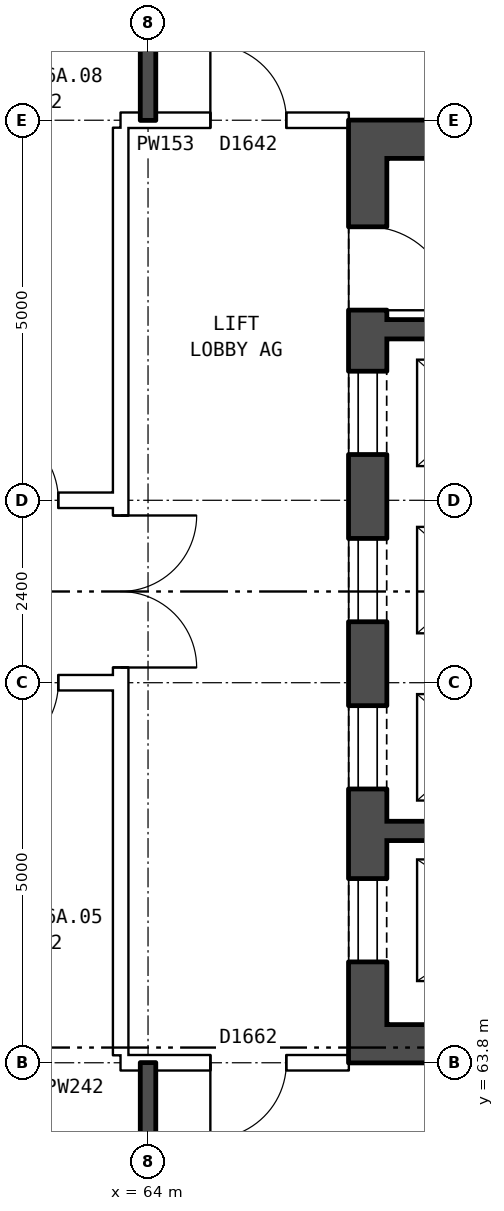
"""IFC4 building model, lengths in metres.
Left out: names, types, materials, properties, quantities, classifications, styles, units other than length and angle.
Written with IfcOpenShell. Run it as: python <this file> out.ifc"""

import sys

from ifc_helpers import new_model, si_unit, direction, frame, frame_2d, origin, place, context, subcontext, project, spatial, rectangle, extrude, element, fill, save


model = new_model("IFC4")
c1 = context("Model", 3, precision=1e-05, world=origin(), true_north=direction((0.0, 1.0)))
c2 = subcontext(c1, "Body", "Model", "MODEL_VIEW")
j1 = project(units=[si_unit("LENGTHUNIT", "METRE"), si_unit("PLANEANGLEUNIT", "RADIAN")], contexts=[c1])
p1 = place(None, origin())
s1 = spatial("IfcSite", under=j1, at=p1, CompositionType="ELEMENT")
p2 = place(p1, origin())
s2 = spatial("IfcBuilding", under=s1, at=p2, CompositionType="ELEMENT")
p3 = place(p2, frame((0.0, 0.0, 164.0)))
s3 = spatial("IfcBuildingStorey", under=s2, at=p3, CompositionType="ELEMENT", Elevation=164.0)
p4 = place(p3, frame((66.89, 63.8, 0.0), z_axis=(0.0, 0.0, 1.0), x_axis=(0.0, 1.0, 0.0)))
e1 = element("IfcWall", 1, at=p4, inside=s3, PredefinedType="SHEAR", context=c2, shape_type="SweptSolid", body=[
    extrude(rectangle(XDim=12.4, YDim=0.5, at=frame_2d((6.2, 0.0))), origin(), (0.0, 0.0, 1.0), 2.85),
])
p5 = place(p4, frame((1.325, 0.0, 0.0)))
e2 = element("IfcOpeningElement", 2, at=p5, cuts=e1, PredefinedType="OPENING", context=c2, shape_type="SweptSolid", body=[
    extrude(rectangle(XDim=1.1, YDim=2.1, at=frame_2d((0.55, 1.05))), frame((0.0, 0.26, 0.0), z_axis=(0.0, -1.0, 0.0), x_axis=(1.0, 0.0, 0.0)), (0.0, 0.0, 1.0), 0.52),
])
p6 = place(p4, frame((3.6, 0.0, 0.0)))
e3 = element("IfcOpeningElement", 3, at=p6, cuts=e1, PredefinedType="OPENING", context=c2, shape_type="SweptSolid", body=[
    extrude(rectangle(XDim=1.1, YDim=2.1, at=frame_2d((0.55, 1.05))), frame((0.0, 0.26, 0.0), z_axis=(0.0, -1.0, 0.0), x_axis=(1.0, 0.0, 0.0)), (0.0, 0.0, 1.0), 0.52),
])
p7 = place(p4, frame((5.8, 0.0, 0.0)))
e4 = element("IfcOpeningElement", 4, at=p7, cuts=e1, PredefinedType="OPENING", context=c2, shape_type="SweptSolid", body=[
    extrude(rectangle(XDim=1.1, YDim=2.1, at=frame_2d((0.55, 1.05))), frame((0.0, 0.26, 0.0), z_axis=(0.0, -1.0, 0.0), x_axis=(1.0, 0.0, 0.0)), (0.0, 0.0, 1.0), 0.52),
])
p8 = place(p4, frame((8.0, 0.0, 0.0)))
e5 = element("IfcOpeningElement", 5, at=p8, cuts=e1, PredefinedType="OPENING", context=c2, shape_type="SweptSolid", body=[
    extrude(rectangle(XDim=1.1, YDim=2.1, at=frame_2d((0.55, 1.05))), frame((0.0, 0.26, 0.0), z_axis=(0.0, -1.0, 0.0), x_axis=(1.0, 0.0, 0.0)), (0.0, 0.0, 1.0), 0.52),
])
p9 = place(p4, frame((9.9, 0.0, 0.0)))
e6 = element("IfcOpeningElement", 6, at=p9, cuts=e1, PredefinedType="OPENING", context=c2, shape_type="SweptSolid", body=[
    extrude(rectangle(XDim=1.1, YDim=2.1, at=frame_2d((0.55, 1.05))), frame((0.0, 0.26, 0.0), z_axis=(0.0, -1.0, 0.0), x_axis=(1.0, 0.0, 0.0)), (0.0, 0.0, 1.0), 0.52),
])
for number, where, z_axis, x_axis in (
    (7, (67.14, 64.05, 0.0), (0.0, 0.0, 1.0), (1.0, 0.0, 0.0)),
    (8, (67.14, 75.95, 0.0), (0.0, 0.0, 1.0), (1.0, 0.0, 0.0)),
):
    element("IfcWall", number, at=place(p3, frame(where, z_axis=z_axis, x_axis=x_axis)), inside=s3, PredefinedType="SHEAR", context=c2, shape_type="SweptSolid", body=[
        extrude(rectangle(XDim=8.0, YDim=0.5, at=frame_2d((4.0, 0.0))), origin(), (0.0, 0.0, 1.0), 2.85),
    ])
p10 = place(p3, frame((67.14, 66.85, 0.0), z_axis=(0.0, 0.0, 1.0), x_axis=(1.0, 0.0, 0.0)))
e9 = element("IfcWall", 9, at=p10, inside=s3, PredefinedType="SHEAR", context=c2, shape_type="SweptSolid", body=[
    extrude(rectangle(XDim=3.495, YDim=0.25, at=frame_2d((1.748, 0.0))), origin(), (0.0, 0.0, 1.0), 2.85),
])
p11 = place(p3, frame((67.14, 73.45, 0.0), z_axis=(0.0, 0.0, 1.0), x_axis=(1.0, 0.0, 0.0)))
e10 = element("IfcWall", 10, at=p11, inside=s3, PredefinedType="SHEAR", context=c2, shape_type="SweptSolid", body=[
    extrude(rectangle(XDim=2.425, YDim=0.25, at=frame_2d((1.212, 0.0))), origin(), (0.0, 0.0, 1.0), 2.85),
])
p12 = place(p3, frame((63.64, 63.9, 0.0), z_axis=(0.0, 0.0, 1.0), x_axis=(0.0, 1.0, 0.0)))
e11 = element("IfcWall", 11, at=p12, inside=s3, PredefinedType="PARTITIONING", context=c2, shape_type="SweptSolid", body=[
    extrude(rectangle(XDim=12.2, YDim=0.2, at=frame_2d((6.1, 0.0))), origin(), (0.0, 0.0, 1.0), 2.85),
])
p13 = place(p12, frame((5.1, 0.0, 0.0)))
e12 = element("IfcOpeningElement", 12, at=p13, cuts=e11, PredefinedType="OPENING", context=c2, shape_type="SweptSolid", body=[
    extrude(rectangle(XDim=2.0, YDim=2.1, at=frame_2d((1.0, 1.05))), frame((0.0, 0.11, 0.0), z_axis=(0.0, -1.0, 0.0), x_axis=(1.0, 0.0, 0.0)), (0.0, 0.0, 1.0), 0.22),
])
p14 = place(p3, frame((63.64, 63.8, 0.0), z_axis=(0.0, 0.0, 1.0), x_axis=(1.0, 0.0, 0.0)))
e13 = element("IfcWall", 13, at=p14, inside=s3, PredefinedType="PARTITIONING", context=c2, shape_type="SweptSolid", body=[
    extrude(rectangle(XDim=3.0, YDim=0.2, at=frame_2d((1.5, 0.0))), origin(), (0.0, 0.0, 1.0), 2.85),
])
p15 = place(p14, frame((1.18, 0.0, 0.0)))
e14 = element("IfcOpeningElement", 14, at=p15, cuts=e13, PredefinedType="OPENING", context=c2, shape_type="SweptSolid", body=[
    extrude(rectangle(XDim=1.0, YDim=2.1, at=frame_2d((0.5, 1.05))), frame((0.0, 0.11, 0.0), z_axis=(0.0, -1.0, 0.0), x_axis=(1.0, 0.0, 0.0)), (0.0, 0.0, 1.0), 0.22),
])
p16 = place(p3, frame((44.36, 68.8, 0.0), z_axis=(0.0, 0.0, 1.0), x_axis=(1.0, 0.0, 0.0)))
e15 = element("IfcWall", 15, at=p16, inside=s3, PredefinedType="PARTITIONING", context=c2, shape_type="SweptSolid", body=[
    extrude(rectangle(XDim=19.28, YDim=0.2, at=frame_2d((9.64, 0.0))), origin(), (0.0, 0.0, 1.0), 2.85),
])
p17 = place(p16, frame((17.46, 0.0, 0.0)))
e16 = element("IfcOpeningElement", 16, at=p17, cuts=e15, PredefinedType="OPENING", context=c2, shape_type="SweptSolid", body=[
    extrude(rectangle(XDim=1.0, YDim=2.1, at=frame_2d((0.5, 1.05))), frame((0.0, 0.11, 0.0), z_axis=(0.0, -1.0, 0.0), x_axis=(1.0, 0.0, 0.0)), (0.0, 0.0, 1.0), 0.22),
])
p18 = place(p16, frame((8.64, 0.0, 0.0)))
e17 = element("IfcOpeningElement", 17, at=p18, cuts=e15, PredefinedType="OPENING", context=c2, shape_type="SweptSolid", body=[
    extrude(rectangle(XDim=1.0, YDim=2.1, at=frame_2d((0.5, 1.05))), frame((0.0, 0.11, 0.0), z_axis=(0.0, -1.0, 0.0), x_axis=(1.0, 0.0, 0.0)), (0.0, 0.0, 1.0), 0.22),
])
p19 = place(p16, frame((2.64, 0.0, 0.0)))
e18 = element("IfcOpeningElement", 18, at=p19, cuts=e15, PredefinedType="OPENING", context=c2, shape_type="SweptSolid", body=[
    extrude(rectangle(XDim=1.0, YDim=2.1, at=frame_2d((0.5, 1.05))), frame((0.0, 0.11, 0.0), z_axis=(0.0, -1.0, 0.0), x_axis=(1.0, 0.0, 0.0)), (0.0, 0.0, 1.0), 0.22),
])
p20 = place(p3, frame((44.36, 71.2, 0.0), z_axis=(0.0, 0.0, 1.0), x_axis=(1.0, 0.0, 0.0)))
e19 = element("IfcWall", 19, at=p20, inside=s3, PredefinedType="PARTITIONING", context=c2, shape_type="SweptSolid", body=[
    extrude(rectangle(XDim=19.28, YDim=0.2, at=frame_2d((9.64, 0.0))), origin(), (0.0, 0.0, 1.0), 2.85),
])
p21 = place(p20, frame((17.46, 0.0, 0.0)))
e20 = element("IfcOpeningElement", 20, at=p21, cuts=e19, PredefinedType="OPENING", context=c2, shape_type="SweptSolid", body=[
    extrude(rectangle(XDim=1.0, YDim=2.1, at=frame_2d((0.5, 1.05))), frame((0.0, 0.11, 0.0), z_axis=(0.0, -1.0, 0.0), x_axis=(1.0, 0.0, 0.0)), (0.0, 0.0, 1.0), 0.22),
])
p22 = place(p20, frame((8.64, 0.0, 0.0)))
e21 = element("IfcOpeningElement", 21, at=p22, cuts=e19, PredefinedType="OPENING", context=c2, shape_type="SweptSolid", body=[
    extrude(rectangle(XDim=1.0, YDim=2.1, at=frame_2d((0.5, 1.05))), frame((0.0, 0.11, 0.0), z_axis=(0.0, -1.0, 0.0), x_axis=(1.0, 0.0, 0.0)), (0.0, 0.0, 1.0), 0.22),
])
p23 = place(p20, frame((2.64, 0.0, 0.0)))
e22 = element("IfcOpeningElement", 22, at=p23, cuts=e19, PredefinedType="OPENING", context=c2, shape_type="SweptSolid", body=[
    extrude(rectangle(XDim=1.0, YDim=2.1, at=frame_2d((0.5, 1.05))), frame((0.0, 0.11, 0.0), z_axis=(0.0, -1.0, 0.0), x_axis=(1.0, 0.0, 0.0)), (0.0, 0.0, 1.0), 0.22),
])
p24 = place(p3, frame((63.64, 76.2, 0.0), z_axis=(0.0, 0.0, 1.0), x_axis=(1.0, 0.0, 0.0)))
e23 = element("IfcWall", 23, at=p24, inside=s3, PredefinedType="PARTITIONING", context=c2, shape_type="SweptSolid", body=[
    extrude(rectangle(XDim=3.0, YDim=0.2, at=frame_2d((1.5, 0.0))), origin(), (0.0, 0.0, 1.0), 2.85),
])
p25 = place(p24, frame((1.18, 0.0, 0.0)))
e24 = element("IfcOpeningElement", 24, at=p25, cuts=e23, PredefinedType="OPENING", context=c2, shape_type="SweptSolid", body=[
    extrude(rectangle(XDim=1.0, YDim=2.1, at=frame_2d((0.5, 1.05))), frame((0.0, 0.11, 0.0), z_axis=(0.0, -1.0, 0.0), x_axis=(1.0, 0.0, 0.0)), (0.0, 0.0, 1.0), 0.22),
])
for number, where, z_axis, x_axis in (
    (25, (64.0, 54.36, 0.0), (0.0, 0.0, 1.0), (0.0, 1.0, 0.0)),
    (26, (64.0, 76.2, 0.0), (0.0, 0.0, 1.0), (0.0, 1.0, 0.0)),
):
    element("IfcWall", number, at=place(p3, frame(where, z_axis=z_axis, x_axis=x_axis)), inside=s3, PredefinedType="SOLIDWALL", context=c2, shape_type="SweptSolid", body=[
        extrude(rectangle(XDim=9.44, YDim=0.2, at=frame_2d((4.72, 0.0))), origin(), (0.0, 0.0, 1.0), 2.85),
    ])
p26 = place(p5, origin())
e27 = element("IfcDoor", 27, at=p26, inside=s3, OperationType="DOUBLE_DOOR_SLIDING", PredefinedType="DOOR", context=c2, shape_type="SweptSolid", body=[
    extrude(rectangle(XDim=1.1, YDim=2.1, at=frame_2d((0.55, 1.05))), frame((0.0, -0.185, 0.0), z_axis=(0.0, -1.0, 0.0), x_axis=(1.0, 0.0, 0.0)), (0.0, 0.0, 1.0), 0.05),
])
fill(e2, e27)
p27 = place(p6, origin())
e28 = element("IfcDoor", 28, at=p27, inside=s3, OperationType="DOUBLE_DOOR_SLIDING", PredefinedType="DOOR", context=c2, shape_type="SweptSolid", body=[
    extrude(rectangle(XDim=1.1, YDim=2.1, at=frame_2d((0.55, 1.05))), frame((0.0, -0.185, 0.0), z_axis=(0.0, -1.0, 0.0), x_axis=(1.0, 0.0, 0.0)), (0.0, 0.0, 1.0), 0.05),
])
fill(e3, e28)
p28 = place(p7, origin())
e29 = element("IfcDoor", 29, at=p28, inside=s3, OperationType="DOUBLE_DOOR_SLIDING", PredefinedType="DOOR", context=c2, shape_type="SweptSolid", body=[
    extrude(rectangle(XDim=1.1, YDim=2.1, at=frame_2d((0.55, 1.05))), frame((0.0, -0.185, 0.0), z_axis=(0.0, -1.0, 0.0), x_axis=(1.0, 0.0, 0.0)), (0.0, 0.0, 1.0), 0.05),
])
fill(e4, e29)
p29 = place(p8, origin())
e30 = element("IfcDoor", 30, at=p29, inside=s3, OperationType="DOUBLE_DOOR_SLIDING", PredefinedType="DOOR", context=c2, shape_type="SweptSolid", body=[
    extrude(rectangle(XDim=1.1, YDim=2.1, at=frame_2d((0.55, 1.05))), frame((0.0, -0.185, 0.0), z_axis=(0.0, -1.0, 0.0), x_axis=(1.0, 0.0, 0.0)), (0.0, 0.0, 1.0), 0.05),
])
fill(e5, e30)
p30 = place(p9, frame((1.1, 0.0, 0.0), z_axis=(0.0, 0.0, 1.0), x_axis=(-1.0, 0.0, 0.0)))
e31 = element("IfcDoor", 31, at=p30, inside=s3, OperationType="SINGLE_SWING_RIGHT", PredefinedType="DOOR", context=c2, shape_type="SweptSolid", body=[
    extrude(rectangle(XDim=1.1, YDim=2.1, at=frame_2d((0.55, 1.05))), frame((0.0, 0.235, 0.0), z_axis=(0.0, -1.0, 0.0), x_axis=(1.0, 0.0, 0.0)), (0.0, 0.0, 1.0), 0.05),
])
fill(e6, e31)
p31 = place(p13, frame((2.0, 0.0, 0.0), z_axis=(0.0, 0.0, 1.0), x_axis=(-1.0, 0.0, 0.0)))
e32 = element("IfcDoor", 32, at=p31, inside=s3, OperationType="DOUBLE_DOOR_SINGLE_SWING", PredefinedType="DOOR", context=c2, shape_type="SweptSolid", body=[
    extrude(rectangle(XDim=2.0, YDim=2.1, at=frame_2d((1.0, 1.05))), frame((0.0, 0.025, 0.0), z_axis=(0.0, -1.0, 0.0), x_axis=(1.0, 0.0, 0.0)), (0.0, 0.0, 1.0), 0.05),
])
fill(e12, e32)
p32 = place(p15, frame((1.0, 0.0, 0.0), z_axis=(0.0, 0.0, 1.0), x_axis=(-1.0, 0.0, 0.0)))
e33 = element("IfcDoor", 33, at=p32, inside=s3, OperationType="SINGLE_SWING_RIGHT", PredefinedType="DOOR", context=c2, shape_type="SweptSolid", body=[
    extrude(rectangle(XDim=1.0, YDim=2.1, at=frame_2d((0.5, 1.05))), frame((0.0, 0.025, 0.0), z_axis=(0.0, -1.0, 0.0), x_axis=(1.0, 0.0, 0.0)), (0.0, 0.0, 1.0), 0.05),
])
fill(e14, e33)
p33 = place(p25, origin())
e34 = element("IfcDoor", 34, at=p33, inside=s3, OperationType="SINGLE_SWING_LEFT", PredefinedType="DOOR", context=c2, shape_type="SweptSolid", body=[
    extrude(rectangle(XDim=1.0, YDim=2.1, at=frame_2d((0.5, 1.05))), frame((0.0, 0.025, 0.0), z_axis=(0.0, -1.0, 0.0), x_axis=(1.0, 0.0, 0.0)), (0.0, 0.0, 1.0), 0.05),
])
fill(e24, e34)
p34 = place(p17, frame((1.0, 0.0, 0.0), z_axis=(0.0, 0.0, 1.0), x_axis=(-1.0, 0.0, 0.0)))
e35 = element("IfcDoor", 35, at=p34, inside=s3, OperationType="SINGLE_SWING_RIGHT", PredefinedType="DOOR", context=c2, shape_type="SweptSolid", body=[
    extrude(rectangle(XDim=1.0, YDim=2.1, at=frame_2d((0.5, 1.05))), frame((0.0, 0.025, 0.0), z_axis=(0.0, -1.0, 0.0), x_axis=(1.0, 0.0, 0.0)), (0.0, 0.0, 1.0), 0.05),
])
fill(e16, e35)
p35 = place(p21, origin())
e36 = element("IfcDoor", 36, at=p35, inside=s3, OperationType="SINGLE_SWING_LEFT", PredefinedType="DOOR", context=c2, shape_type="SweptSolid", body=[
    extrude(rectangle(XDim=1.0, YDim=2.1, at=frame_2d((0.5, 1.05))), frame((0.0, 0.025, 0.0), z_axis=(0.0, -1.0, 0.0), x_axis=(1.0, 0.0, 0.0)), (0.0, 0.0, 1.0), 0.05),
])
fill(e20, e36)
save(model, sys.argv[1])
